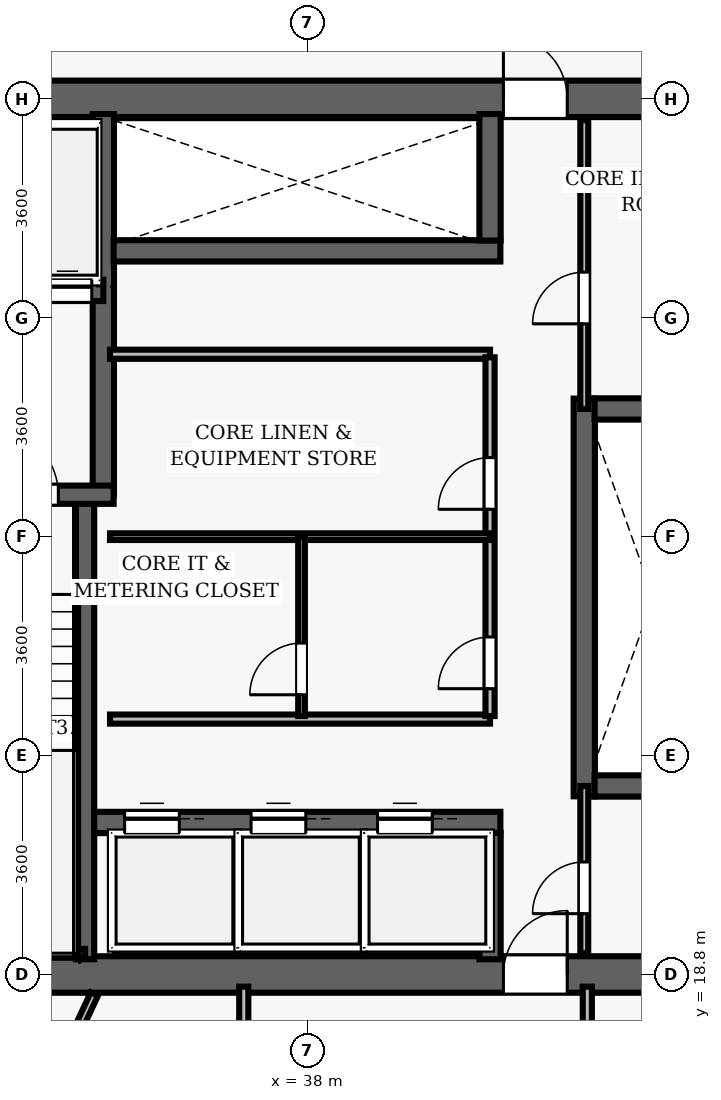
"""IFC4 building model, lengths in metres.
Left out: names, types, materials, properties, quantities, classifications, styles, units other than length and angle.
Written with IfcOpenShell. Run it as: python <this file> out.ifc"""

import sys

from ifc_helpers import new_model, si_unit, direction, frame, frame_2d, origin, place, context, subcontext, project, spatial, rectangle, extrude, element, fill, save


model = new_model("IFC4")
c1 = context("Model", 3, precision=1e-05, world=origin(), true_north=direction((0.0, 1.0)))
c2 = subcontext(c1, "Body", "Model", "MODEL_VIEW")
j1 = project(units=[si_unit("LENGTHUNIT", "METRE"), si_unit("PLANEANGLEUNIT", "RADIAN")], contexts=[c1])
p1 = place(None, origin())
s1 = spatial("IfcSite", under=j1, at=p1, CompositionType="ELEMENT")
p2 = place(p1, origin())
s2 = spatial("IfcBuilding", under=s1, at=p2, CompositionType="ELEMENT")
p3 = place(p2, frame((0.0, 0.0, 106.3)))
s3 = spatial("IfcBuildingStorey", under=s2, at=p3, CompositionType="ELEMENT", Elevation=106.3)
p4 = place(p3, frame((26.7, 18.8, 0.0), z_axis=(0.0, 0.0, 1.0), x_axis=(1.0, 0.0, 0.0)))
e1 = element("IfcWall", 1, at=p4, inside=s3, PredefinedType="SHEAR", context=c2, shape_type="SweptSolid", body=[
    extrude(rectangle(XDim=22.6, YDim=0.6, at=frame_2d((11.3, 0.0))), origin(), (0.0, 0.0, 1.0), 3.5),
])
p5 = place(p4, frame((14.52, 0.0, 0.0)))
e2 = element("IfcOpeningElement", 2, at=p5, cuts=e1, PredefinedType="OPENING", context=c2, shape_type="SweptSolid", body=[
    extrude(rectangle(XDim=1.05, YDim=2.15, at=frame_2d((0.525, 1.075))), frame((0.0, 0.31, 0.0), z_axis=(0.0, -1.0, 0.0), x_axis=(1.0, 0.0, 0.0)), (0.0, 0.0, 1.0), 0.62),
])
p6 = place(p3, frame((26.7, 33.2, 0.0), z_axis=(0.0, 0.0, 1.0), x_axis=(1.0, 0.0, 0.0)))
e3 = element("IfcWall", 3, at=p6, inside=s3, PredefinedType="SHEAR", context=c2, shape_type="SweptSolid", body=[
    extrude(rectangle(XDim=22.6, YDim=0.6, at=frame_2d((11.3, 0.0))), origin(), (0.0, 0.0, 1.0), 3.5),
])
p7 = place(p6, frame((4.62, 0.0, 0.0)))
e4 = element("IfcOpeningElement", 4, at=p7, cuts=e3, PredefinedType="OPENING", context=c2, shape_type="SweptSolid", body=[
    extrude(rectangle(XDim=1.05, YDim=2.15, at=frame_2d((0.525, 1.075))), frame((0.0, 0.31, 0.0), z_axis=(0.0, -1.0, 0.0), x_axis=(1.0, 0.0, 0.0)), (0.0, 0.0, 1.0), 0.62),
])
p8 = place(p6, frame((14.52, 0.0, 0.0)))
e5 = element("IfcOpeningElement", 5, at=p8, cuts=e3, PredefinedType="OPENING", context=c2, shape_type="SweptSolid", body=[
    extrude(rectangle(XDim=1.05, YDim=2.15, at=frame_2d((0.525, 1.075))), frame((0.0, 0.31, 0.0), z_axis=(0.0, -1.0, 0.0), x_axis=(1.0, 0.0, 0.0)), (0.0, 0.0, 1.0), 0.62),
])
p9 = place(p3, frame((34.34, 19.05, 0.0), z_axis=(0.0, 0.0, 1.0), x_axis=(0.0, 1.0, 0.0)))
e6 = element("IfcWall", 6, at=p9, inside=s3, PredefinedType="SHEAR", context=c2, shape_type="SweptSolid", body=[
    extrude(rectangle(XDim=7.5, YDim=0.3, at=frame_2d((3.75, 0.0))), origin(), (0.0, 0.0, 1.0), 3.5),
])
p10 = place(p3, frame((34.64, 26.69, 0.0), z_axis=(0.0, 0.0, 1.0), x_axis=(0.0, 1.0, 0.0)))
e7 = element("IfcWall", 7, at=p10, inside=s3, PredefinedType="SHEAR", context=c2, shape_type="SweptSolid", body=[
    extrude(rectangle(XDim=6.26, YDim=0.35, at=frame_2d((3.13, 0.0))), origin(), (0.0, 0.0, 1.0), 3.5),
])
p11 = place(p3, frame((31.25, 26.69, 0.0), z_axis=(0.0, 0.0, 1.0), x_axis=(1.0, 0.0, 0.0)))
e8 = element("IfcWall", 8, at=p11, inside=s3, PredefinedType="SHEAR", context=c2, shape_type="SweptSolid", body=[
    extrude(rectangle(XDim=3.56, YDim=0.3, at=frame_2d((1.78, 0.0))), origin(), (0.0, 0.0, 1.0), 3.5),
])
p12 = place(p11, frame((1.55, 0.0, 0.0)))
e9 = element("IfcOpeningElement", 9, at=p12, cuts=e8, PredefinedType="OPENING", context=c2, shape_type="SweptSolid", body=[
    extrude(rectangle(XDim=1.1, YDim=2.15, at=frame_2d((0.55, 1.075))), frame((0.0, 0.16, 0.0), z_axis=(0.0, -1.0, 0.0), x_axis=(1.0, 0.0, 0.0)), (0.0, 0.0, 1.0), 0.32),
])
p13 = place(p3, frame((31.3, 19.16, 0.0), z_axis=(0.0, 0.0, 1.0), x_axis=(1.0, 0.0, 0.0)))
e10 = element("IfcWall", 10, at=p13, inside=s3, PredefinedType="SHEAR", context=c2, shape_type="SweptSolid", body=[
    extrude(rectangle(XDim=3.04, YDim=0.12, at=frame_2d((1.52, 0.0))), origin(), (0.0, 0.0, 1.0), 3.5),
])
p14 = place(p3, frame((32.23, 30.05, 0.0), z_axis=(0.0, 0.0, 1.0), x_axis=(1.0, 0.0, 0.0)))
e11 = element("IfcWall", 11, at=p14, inside=s3, PredefinedType="SHEAR", context=c2, shape_type="SweptSolid", body=[
    extrude(rectangle(XDim=2.41, YDim=0.35, at=frame_2d((1.205, 0.0))), origin(), (0.0, 0.0, 1.0), 2.675),
])
p15 = place(p14, frame((0.42, 0.0, 0.0)))
e12 = element("IfcOpeningElement", 12, at=p15, cuts=e11, PredefinedType="OPENING", context=c2, shape_type="SweptSolid", body=[
    extrude(rectangle(XDim=0.8, YDim=2.15, at=frame_2d((0.4, 1.075))), frame((0.0, 0.185, 0.0), z_axis=(0.0, -1.0, 0.0), x_axis=(1.0, 0.0, 0.0)), (0.0, 0.0, 1.0), 0.37),
])
p16 = place(p14, frame((1.42, 0.0, 0.0)))
e13 = element("IfcOpeningElement", 13, at=p16, cuts=e11, PredefinedType="OPENING", context=c2, shape_type="SweptSolid", body=[
    extrude(rectangle(XDim=0.8, YDim=2.15, at=frame_2d((0.4, 1.075))), frame((0.0, 0.185, 0.0), z_axis=(0.0, -1.0, 0.0), x_axis=(1.0, 0.0, 0.0)), (0.0, 0.0, 1.0), 0.37),
])
p17 = place(p3, frame((42.55, 21.73, 0.0), z_axis=(0.0, 0.0, 1.0), x_axis=(0.0, 1.0, 0.0)))
e14 = element("IfcWall", 14, at=p17, inside=s3, PredefinedType="SHEAR", context=c2, shape_type="SweptSolid", body=[
    extrude(rectangle(XDim=6.54, YDim=0.35, at=frame_2d((3.27, 0.0))), origin(), (0.0, 0.0, 1.0), 2.675),
])
for number, where, z_axis, x_axis in (
    (15, (42.72, 21.9, 0.0), (0.0, 0.0, 1.0), (1.0, 0.0, 0.0)),
    (16, (42.72, 28.1, 0.0), (0.0, 0.0, 1.0), (1.0, 0.0, 0.0)),
):
    element("IfcWall", number, at=place(p3, frame(where, z_axis=z_axis, x_axis=x_axis)), inside=s3, PredefinedType="SHEAR", context=c2, shape_type="SweptSolid", body=[
        extrude(rectangle(XDim=2.03, YDim=0.35, at=frame_2d((1.015, 0.0))), origin(), (0.0, 0.0, 1.0), 2.675),
    ])
p18 = place(p3, frame((34.81, 30.7, 0.0), z_axis=(0.0, 0.0, 1.0), x_axis=(1.0, 0.0, 0.0)))
e17 = element("IfcWall", 17, at=p18, inside=s3, PredefinedType="SHEAR", context=c2, shape_type="SweptSolid", body=[
    extrude(rectangle(XDim=6.36, YDim=0.35, at=frame_2d((3.18, 0.0))), origin(), (0.0, 0.0, 1.0), 2.675),
])
p19 = place(p3, frame((41.0, 30.87, 0.0), z_axis=(0.0, 0.0, 1.0), x_axis=(0.0, 1.0, 0.0)))
e18 = element("IfcWall", 18, at=p19, inside=s3, PredefinedType="SHEAR", context=c2, shape_type="SweptSolid", body=[
    extrude(rectangle(XDim=2.08, YDim=0.35, at=frame_2d((1.04, 0.0))), origin(), (0.0, 0.0, 1.0), 2.675),
])
p20 = place(p3, frame((34.49, 21.3, 0.0), z_axis=(0.0, 0.0, 1.0), x_axis=(1.0, 0.0, 0.0)))
e19 = element("IfcWall", 19, at=p20, inside=s3, PredefinedType="SHEAR", context=c2, shape_type="SweptSolid", body=[
    extrude(rectangle(XDim=6.68, YDim=0.35, at=frame_2d((3.34, 0.0))), origin(), (0.0, 0.0, 1.0), 2.675),
])
p21 = place(p20, frame((0.5, 0.0, 0.0)))
e20 = element("IfcOpeningElement", 20, at=p21, cuts=e19, PredefinedType="OPENING", context=c2, shape_type="SweptSolid", body=[
    extrude(rectangle(XDim=0.9, YDim=2.15, at=frame_2d((0.45, 1.075))), frame((0.0, 0.185, 0.0), z_axis=(0.0, -1.0, 0.0), x_axis=(1.0, 0.0, 0.0)), (0.0, 0.0, 1.0), 0.37),
])
p22 = place(p20, frame((2.58, 0.0, 0.0)))
e21 = element("IfcOpeningElement", 21, at=p22, cuts=e19, PredefinedType="OPENING", context=c2, shape_type="SweptSolid", body=[
    extrude(rectangle(XDim=0.9, YDim=2.15, at=frame_2d((0.45, 1.075))), frame((0.0, 0.185, 0.0), z_axis=(0.0, -1.0, 0.0), x_axis=(1.0, 0.0, 0.0)), (0.0, 0.0, 1.0), 0.37),
])
p23 = place(p20, frame((4.66, 0.0, 0.0)))
e22 = element("IfcOpeningElement", 22, at=p23, cuts=e19, PredefinedType="OPENING", context=c2, shape_type="SweptSolid", body=[
    extrude(rectangle(XDim=0.9, YDim=2.15, at=frame_2d((0.45, 1.075))), frame((0.0, 0.185, 0.0), z_axis=(0.0, -1.0, 0.0), x_axis=(1.0, 0.0, 0.0)), (0.0, 0.0, 1.0), 0.37),
])
p24 = place(p3, frame((41.0, 19.05, 0.0), z_axis=(0.0, 0.0, 1.0), x_axis=(0.0, 1.0, 0.0)))
e23 = element("IfcWall", 23, at=p24, inside=s3, PredefinedType="SHEAR", context=c2, shape_type="SweptSolid", body=[
    extrude(rectangle(XDim=2.08, YDim=0.35, at=frame_2d((1.04, 0.0))), origin(), (0.0, 0.0, 1.0), 2.675),
])
for number, where, z_axis, x_axis in (
    (24, (34.75, 29.0, 0.0), (0.0, 0.0, 1.0), (1.0, 0.0, 0.0)),
    (25, (34.75, 23.0, 0.0), (0.0, 0.0, 1.0), (1.0, 0.0, 0.0)),
):
    element("IfcWall", number, at=place(p3, frame(where, z_axis=z_axis, x_axis=x_axis)), inside=s3, PredefinedType="PARTITIONING", context=c2, shape_type="SweptSolid", body=[
        extrude(rectangle(XDim=6.25, YDim=0.15, at=frame_2d((3.125, 0.0))), origin(), (0.0, 0.0, 1.0), 2.675),
    ])
p25 = place(p3, frame((41.0, 23.05, 0.0), z_axis=(0.0, 0.0, 1.0), x_axis=(0.0, 1.0, 0.0)))
e26 = element("IfcWall", 26, at=p25, inside=s3, PredefinedType="PARTITIONING", context=c2, shape_type="SweptSolid", body=[
    extrude(rectangle(XDim=5.9, YDim=0.15, at=frame_2d((2.95, 0.0))), origin(), (0.0, 0.0, 1.0), 2.675),
])
p26 = place(p25, frame((3.4, 0.0, 0.0)))
e27 = element("IfcOpeningElement", 27, at=p26, cuts=e26, PredefinedType="OPENING", context=c2, shape_type="SweptSolid", body=[
    extrude(rectangle(XDim=0.85, YDim=2.1, at=frame_2d((0.425, 1.05))), frame((0.0, 0.085, 0.0), z_axis=(0.0, -1.0, 0.0), x_axis=(1.0, 0.0, 0.0)), (0.0, 0.0, 1.0), 0.17),
])
p27 = place(p25, frame((0.45, 0.0, 0.0)))
e28 = element("IfcOpeningElement", 28, at=p27, cuts=e26, PredefinedType="OPENING", context=c2, shape_type="SweptSolid", body=[
    extrude(rectangle(XDim=0.85, YDim=2.1, at=frame_2d((0.425, 1.05))), frame((0.0, 0.085, 0.0), z_axis=(0.0, -1.0, 0.0), x_axis=(1.0, 0.0, 0.0)), (0.0, 0.0, 1.0), 0.17),
])
p28 = place(p3, frame((34.75, 26.0, 0.0), z_axis=(0.0, 0.0, 1.0), x_axis=(1.0, 0.0, 0.0)))
e29 = element("IfcWall", 29, at=p28, inside=s3, PredefinedType="PARTITIONING", context=c2, shape_type="SweptSolid", body=[
    extrude(rectangle(XDim=6.25, YDim=0.11, at=frame_2d((3.125, 0.0))), origin(), (0.0, 0.0, 1.0), 2.675),
])
p29 = place(p3, frame((37.9, 23.05, 0.0), z_axis=(0.0, 0.0, 1.0), x_axis=(0.0, 1.0, 0.0)))
e30 = element("IfcWall", 30, at=p29, inside=s3, PredefinedType="PARTITIONING", context=c2, shape_type="SweptSolid", body=[
    extrude(rectangle(XDim=2.95, YDim=0.11, at=frame_2d((1.475, 0.0))), origin(), (0.0, 0.0, 1.0), 2.675),
])
p30 = place(p29, frame((0.35, 0.0, 0.0)))
e31 = element("IfcOpeningElement", 31, at=p30, cuts=e30, PredefinedType="OPENING", context=c2, shape_type="SweptSolid", body=[
    extrude(rectangle(XDim=0.85, YDim=2.1, at=frame_2d((0.425, 1.05))), frame((0.0, 0.065, 0.0), z_axis=(0.0, -1.0, 0.0), x_axis=(1.0, 0.0, 0.0)), (0.0, 0.0, 1.0), 0.13),
])
p31 = place(p3, frame((42.55, 28.1, 0.0), z_axis=(0.0, 0.0, 1.0), x_axis=(0.0, 1.0, 0.0)))
e32 = element("IfcWall", 32, at=p31, inside=s3, PredefinedType="PARTITIONING", context=c2, shape_type="SweptSolid", body=[
    extrude(rectangle(XDim=4.75, YDim=0.13, at=frame_2d((2.375, 0.0))), origin(), (0.0, 0.0, 1.0), 2.675),
])
p32 = place(p31, frame((1.4, 0.0, 0.0)))
e33 = element("IfcOpeningElement", 33, at=p32, cuts=e32, PredefinedType="OPENING", context=c2, shape_type="SweptSolid", body=[
    extrude(rectangle(XDim=0.85, YDim=2.1, at=frame_2d((0.425, 1.05))), frame((0.0, 0.075, 0.0), z_axis=(0.0, -1.0, 0.0), x_axis=(1.0, 0.0, 0.0)), (0.0, 0.0, 1.0), 0.15),
])
p33 = place(p3, frame((42.55, 19.15, 0.0), z_axis=(0.0, 0.0, 1.0), x_axis=(0.0, 1.0, 0.0)))
e34 = element("IfcWall", 34, at=p33, inside=s3, PredefinedType="PARTITIONING", context=c2, shape_type="SweptSolid", body=[
    extrude(rectangle(XDim=2.75, YDim=0.13, at=frame_2d((1.375, 0.0))), origin(), (0.0, 0.0, 1.0), 2.675),
])
p34 = place(p33, frame((0.65, 0.0, 0.0)))
e35 = element("IfcOpeningElement", 35, at=p34, cuts=e34, PredefinedType="OPENING", context=c2, shape_type="SweptSolid", body=[
    extrude(rectangle(XDim=0.85, YDim=2.1, at=frame_2d((0.425, 1.05))), frame((0.0, 0.075, 0.0), z_axis=(0.0, -1.0, 0.0), x_axis=(1.0, 0.0, 0.0)), (0.0, 0.0, 1.0), 0.15),
])
p35 = place(p3, frame((36.95, 11.2, 0.0), z_axis=(0.0, 0.0, 1.0), x_axis=(0.0, 1.0, 0.0)))
e36 = element("IfcWall", 36, at=p35, inside=s3, PredefinedType="PARTITIONING", context=c2, shape_type="SweptSolid", body=[
    extrude(rectangle(XDim=7.4, YDim=0.15, at=frame_2d((3.7, 0.0))), origin(), (0.0, 0.0, 1.0), 2.675),
])
p36 = place(p35, frame((5.075, 0.0, 0.0)))
e37 = element("IfcOpeningElement", 37, at=p36, cuts=e36, PredefinedType="OPENING", context=c2, shape_type="SweptSolid", body=[
    extrude(rectangle(XDim=0.95, YDim=2.15, at=frame_2d((0.475, 1.075))), frame((0.0, 0.085, 0.0), z_axis=(0.0, -1.0, 0.0), x_axis=(1.0, 0.0, 0.0)), (0.0, 0.0, 1.0), 0.17),
])
p37 = place(p3, frame((42.6, 16.65, 0.0), z_axis=(0.0, 0.0, 1.0), x_axis=(0.0, 1.0, 0.0)))
e38 = element("IfcWall", 38, at=p37, inside=s3, PredefinedType="PARTITIONING", context=c2, shape_type="SweptSolid", body=[
    extrude(rectangle(XDim=1.95, YDim=0.15, at=frame_2d((0.975, 0.0))), origin(), (0.0, 0.0, 1.0), 2.675),
])
p38 = place(p3, frame((34.493, 18.48, 0.0), z_axis=(0.0, 0.0, 1.0), x_axis=(-0.422624514594, -0.906304871257, 0.0)))
e39 = element("IfcWall", 39, at=p38, inside=s3, PredefinedType="PARTITIONING", context=c2, shape_type="SweptSolid", body=[
    extrude(rectangle(XDim=14.803, YDim=0.13, at=frame_2d((7.401, 0.0))), origin(), (0.0, 0.0, 1.0), 2.675),
])
p39 = place(p12, origin())
e40 = element("IfcDoor", 40, at=p39, inside=s3, OperationType="SINGLE_SWING_LEFT", PredefinedType="DOOR", context=c2, shape_type="SweptSolid", body=[
    extrude(rectangle(XDim=1.1, YDim=2.15, at=frame_2d((0.55, 1.075))), frame((0.0, 0.025, 0.0), z_axis=(0.0, -1.0, 0.0), x_axis=(1.0, 0.0, 0.0)), (0.0, 0.0, 1.0), 0.05),
])
fill(e9, e40)
p40 = place(p8, origin())
e41 = element("IfcDoor", 41, at=p40, inside=s3, OperationType="SINGLE_SWING_LEFT", PredefinedType="DOOR", context=c2, shape_type="SweptSolid", body=[
    extrude(rectangle(XDim=1.05, YDim=2.15, at=frame_2d((0.525, 1.075))), frame((0.0, 0.025, 0.0), z_axis=(0.0, -1.0, 0.0), x_axis=(1.0, 0.0, 0.0)), (0.0, 0.0, 1.0), 0.05),
])
fill(e5, e41)
p41 = place(p5, origin())
e42 = element("IfcDoor", 42, at=p41, inside=s3, OperationType="SINGLE_SWING_RIGHT", PredefinedType="DOOR", context=c2, shape_type="SweptSolid", body=[
    extrude(rectangle(XDim=1.05, YDim=2.15, at=frame_2d((0.525, 1.075))), frame((0.0, 0.025, 0.0), z_axis=(0.0, -1.0, 0.0), x_axis=(1.0, 0.0, 0.0)), (0.0, 0.0, 1.0), 0.05),
])
fill(e2, e42)
p42 = place(p26, origin())
e43 = element("IfcDoor", 43, at=p42, inside=s3, OperationType="SINGLE_SWING_LEFT", PredefinedType="DOOR", context=c2, shape_type="SweptSolid", body=[
    extrude(rectangle(XDim=0.85, YDim=2.1, at=frame_2d((0.425, 1.05))), frame((0.0, 0.025, 0.0), z_axis=(0.0, -1.0, 0.0), x_axis=(1.0, 0.0, 0.0)), (0.0, 0.0, 1.0), 0.05),
])
fill(e27, e43)
p43 = place(p27, origin())
e44 = element("IfcDoor", 44, at=p43, inside=s3, OperationType="SINGLE_SWING_LEFT", PredefinedType="DOOR", context=c2, shape_type="SweptSolid", body=[
    extrude(rectangle(XDim=0.85, YDim=2.1, at=frame_2d((0.425, 1.05))), frame((0.0, 0.025, 0.0), z_axis=(0.0, -1.0, 0.0), x_axis=(1.0, 0.0, 0.0)), (0.0, 0.0, 1.0), 0.05),
])
fill(e28, e44)
p44 = place(p30, origin())
e45 = element("IfcDoor", 45, at=p44, inside=s3, OperationType="SINGLE_SWING_LEFT", PredefinedType="DOOR", context=c2, shape_type="SweptSolid", body=[
    extrude(rectangle(XDim=0.85, YDim=2.1, at=frame_2d((0.425, 1.05))), frame((0.0, 0.025, 0.0), z_axis=(0.0, -1.0, 0.0), x_axis=(1.0, 0.0, 0.0)), (0.0, 0.0, 1.0), 0.05),
])
fill(e31, e45)
p45 = place(p32, origin())
e46 = element("IfcDoor", 46, at=p45, inside=s3, OperationType="SINGLE_SWING_LEFT", PredefinedType="DOOR", context=c2, shape_type="SweptSolid", body=[
    extrude(rectangle(XDim=0.85, YDim=2.1, at=frame_2d((0.425, 1.05))), frame((0.0, 0.025, 0.0), z_axis=(0.0, -1.0, 0.0), x_axis=(1.0, 0.0, 0.0)), (0.0, 0.0, 1.0), 0.05),
])
fill(e33, e46)
p46 = place(p34, origin())
e47 = element("IfcDoor", 47, at=p46, inside=s3, OperationType="SINGLE_SWING_LEFT", PredefinedType="DOOR", context=c2, shape_type="SweptSolid", body=[
    extrude(rectangle(XDim=0.85, YDim=2.1, at=frame_2d((0.425, 1.05))), frame((0.0, 0.025, 0.0), z_axis=(0.0, -1.0, 0.0), x_axis=(1.0, 0.0, 0.0)), (0.0, 0.0, 1.0), 0.05),
])
fill(e35, e47)
p47 = place(p21, origin())
e48 = element("IfcDoor", 48, at=p47, inside=s3, OperationType="SLIDING_TO_LEFT", PredefinedType="DOOR", context=c2, shape_type="SweptSolid", body=[
    extrude(rectangle(XDim=0.9, YDim=2.15, at=frame_2d((0.45, 1.075))), frame((0.0, 0.025, 0.0), z_axis=(0.0, -1.0, 0.0), x_axis=(1.0, 0.0, 0.0)), (0.0, 0.0, 1.0), 0.05),
])
fill(e20, e48)
p48 = place(p22, origin())
e49 = element("IfcDoor", 49, at=p48, inside=s3, OperationType="SLIDING_TO_LEFT", PredefinedType="DOOR", context=c2, shape_type="SweptSolid", body=[
    extrude(rectangle(XDim=0.9, YDim=2.15, at=frame_2d((0.45, 1.075))), frame((0.0, 0.025, 0.0), z_axis=(0.0, -1.0, 0.0), x_axis=(1.0, 0.0, 0.0)), (0.0, 0.0, 1.0), 0.05),
])
fill(e21, e49)
p49 = place(p23, origin())
e50 = element("IfcDoor", 50, at=p49, inside=s3, OperationType="SLIDING_TO_LEFT", PredefinedType="DOOR", context=c2, shape_type="SweptSolid", body=[
    extrude(rectangle(XDim=0.9, YDim=2.15, at=frame_2d((0.45, 1.075))), frame((0.0, 0.025, 0.0), z_axis=(0.0, -1.0, 0.0), x_axis=(1.0, 0.0, 0.0)), (0.0, 0.0, 1.0), 0.05),
])
fill(e22, e50)
p50 = place(p16, origin())
e51 = element("IfcDoor", 51, at=p50, inside=s3, OperationType="SLIDING_TO_LEFT", PredefinedType="DOOR", context=c2, shape_type="SweptSolid", body=[
    extrude(rectangle(XDim=0.8, YDim=2.15, at=frame_2d((0.4, 1.075))), frame((0.0, 0.025, 0.0), z_axis=(0.0, -1.0, 0.0), x_axis=(1.0, 0.0, 0.0)), (0.0, 0.0, 1.0), 0.05),
])
fill(e13, e51)
save(model, sys.argv[1])
